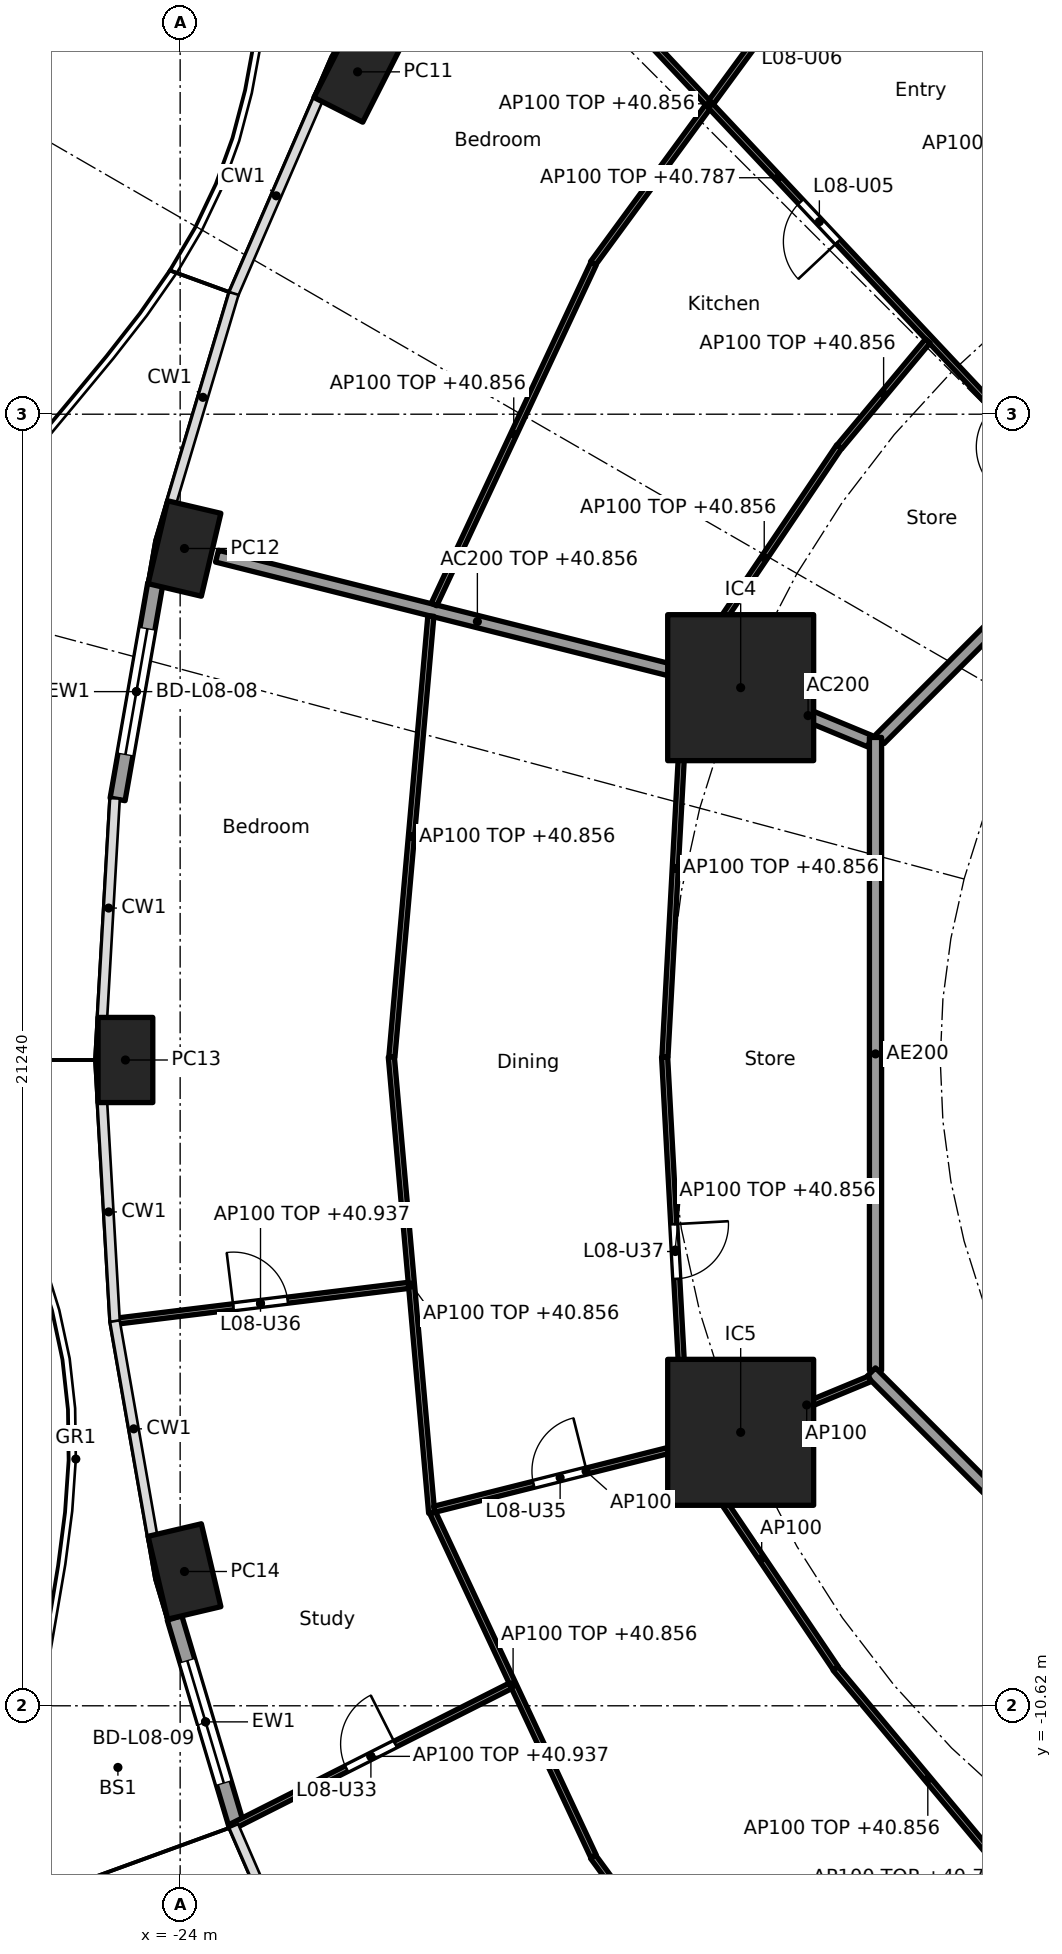
"""IFC4 building model, lengths in metres.
Left out: names, types, materials, properties, quantities, classifications, styles, units other than length and angle.
Written with IfcOpenShell. Run it as: python <this file> out.ifc"""

import sys

from ifc_helpers import new_model, si_unit, direction, frame, frame_2d, origin, origin_2d, place, context, subcontext, project, spatial, rectangle, hollow_rectangle, extrude, element, fill, save


model = new_model("IFC4")
c1 = context("Model", 3, precision=1e-05, world=origin(), true_north=direction((0.0, 1.0)))
c2 = subcontext(c1, "Body", "Model", "MODEL_VIEW")
j1 = project(units=[si_unit("LENGTHUNIT", "METRE"), si_unit("PLANEANGLEUNIT", "RADIAN")], contexts=[c1])
p1 = place(None, origin())
s1 = spatial("IfcSite", under=j1, at=p1, CompositionType="ELEMENT")
p2 = place(p1, origin())
s2 = spatial("IfcBuilding", under=s1, at=p2, CompositionType="ELEMENT")
p3 = place(p2, frame((0.0, 0.0, 38.1)))
s3 = spatial("IfcBuildingStorey", under=s2, at=p3, CompositionType="ELEMENT", Elevation=38.1)
for number, where, z_axis, x_axis in (
    (1, (-21.082, 16.25, 0.0), (0.0, 0.0, 1.0), (-0.452, -0.892, 0.0)),
    (2, (-23.929, 8.412, 0.0), (0.0, 0.0, 1.0), (-0.229, -0.973, 0.0)),
    (3, (-24.9, 0.0, 0.0), (0.0, 0.0, 1.0), (0.0, -1.0, 0.0)),
    (4, (-23.929, -8.412, 0.0), (0.0, 0.0, 1.0), (0.229, -0.973, 0.0)),
):
    element("IfcColumn", number, at=place(p3, frame(where, z_axis=z_axis, x_axis=x_axis)), inside=s3, PredefinedType="COLUMN", context=c2, shape_type="SweptSolid", body=[
        extrude(hollow_rectangle(XDim=1.4, YDim=0.9, WallThickness=0.05, at=origin_2d()), origin(), (0.0, 0.0, 1.0), 3.7),
    ])
for number, where, z_axis, x_axis in (
    (5, (-14.782, 6.123, 0.0), (0.0, 0.0, 1.0), (1.0, 0.0, 0.0)),
    (6, (-14.782, -6.123, 0.0), (0.0, 0.0, 1.0), (1.0, 0.0, 0.0)),
):
    element("IfcColumn", number, at=place(p3, frame(where, z_axis=z_axis, x_axis=x_axis)), inside=s3, PredefinedType="COLUMN", context=c2, shape_type="SweptSolid", body=[
        extrude(rectangle(XDim=2.4, YDim=2.4, at=origin_2d()), origin(), (0.0, 0.0, 1.0), 3.7),
    ])
p4 = place(p3, frame((-25.029, 4.286, 0.0), z_axis=(0.0, 0.0, 1.0), x_axis=(0.172217377323, 0.98505897029, 0.0)))
e7 = element("IfcWall", 7, at=p4, inside=s3, PredefinedType="SOLIDWALL", context=c2, shape_type="SweptSolid", body=[
    extrude(rectangle(XDim=3.598, YDim=0.25, at=frame_2d((1.799, 0.0))), origin(), (0.0, 0.0, 1.0), 3.44),
])
p5 = place(p4, frame((0.749, 0.0, 0.0)))
e8 = element("IfcOpeningElement", 8, at=p5, cuts=e7, PredefinedType="OPENING", context=c2, shape_type="SweptSolid", body=[
    extrude(rectangle(XDim=2.1, YDim=2.4, at=frame_2d((1.05, 1.2))), frame((0.0, 0.135, 0.0), z_axis=(0.0, -1.0, 0.0), x_axis=(1.0, 0.0, 0.0)), (0.0, 0.0, 1.0), 0.27),
])
p6 = place(p3, frame((-23.073, -12.593, 0.0), z_axis=(0.0, 0.0, 1.0), x_axis=(-0.285871309426, 0.958268018065, 0.0)))
e9 = element("IfcWall", 9, at=p6, inside=s3, PredefinedType="SOLIDWALL", context=c2, shape_type="SweptSolid", body=[
    extrude(rectangle(XDim=3.565, YDim=0.25, at=frame_2d((1.783, 0.0))), origin(), (0.0, 0.0, 1.0), 3.44),
])
p7 = place(p6, frame((0.733, 0.0, 0.0)))
e10 = element("IfcOpeningElement", 10, at=p7, cuts=e9, PredefinedType="OPENING", context=c2, shape_type="SweptSolid", body=[
    extrude(rectangle(XDim=2.1, YDim=2.4, at=frame_2d((1.05, 1.2))), frame((0.0, 0.135, 0.0), z_axis=(0.0, -1.0, 0.0), x_axis=(1.0, 0.0, 0.0)), (0.0, 0.0, 1.0), 0.27),
])
p8 = place(p3, frame((-12.657, 5.243, 0.0), z_axis=(0.0, 0.0, 1.0), x_axis=(-0.923885664896, 0.382668627144, 0.0)))
e11 = element("IfcWall", 11, at=p8, inside=s3, PredefinedType="PARTITIONING", context=c2, shape_type="SweptSolid", body=[
    extrude(rectangle(XDim=2.2, YDim=0.2, at=frame_2d((1.1, 0.0))), origin(), (0.0, 0.0, 1.0), 3.44),
])
p9 = place(p3, frame((-14.831, 6.135, 0.0), z_axis=(0.0, 0.0, 1.0), x_axis=(-0.969884949569, 0.243563512454, 0.0)))
e12 = element("IfcWall", 12, at=p9, inside=s3, PredefinedType="PARTITIONING", context=c2, shape_type="SweptSolid", body=[
    extrude(rectangle(XDim=8.829, YDim=0.2, at=frame_2d((4.415, 0.0))), origin(), (0.0, 0.0, 1.0), 2.756),
])
p10 = place(p3, frame((-5.275, 12.494, 0.0), z_axis=(0.0, 0.0, 1.0), x_axis=(-0.707106781187, -0.707106781187, 0.0)))
e13 = element("IfcWall", 13, at=p10, inside=s3, PredefinedType="PARTITIONING", context=c2, shape_type="SweptSolid", body=[
    extrude(rectangle(XDim=10.209, YDim=0.2, at=frame_2d((5.104, 0.0))), origin(), (0.0, 0.0, 1.0), 3.44),
])
p11 = place(p10, frame((2.87, 0.0, 0.0)))
e14 = element("IfcOpeningElement", 14, at=p11, cuts=e13, PredefinedType="OPENING", context=c2, shape_type="SweptSolid", body=[
    extrude(rectangle(XDim=1.0, YDim=2.1, at=frame_2d((0.5, 1.05))), frame((0.0, 0.11, 0.0), z_axis=(0.0, -1.0, 0.0), x_axis=(1.0, 0.0, 0.0)), (0.0, 0.0, 1.0), 0.22),
])
p12 = place(p3, frame((-12.565, 5.304, 0.0), z_axis=(0.0, 0.0, 1.0), x_axis=(0.0, -1.0, 0.0)))
e15 = element("IfcWall", 15, at=p12, inside=s3, PredefinedType="PARTITIONING", context=c2, shape_type="SweptSolid", body=[
    extrude(rectangle(XDim=10.409, YDim=0.2, at=frame_2d((5.205, 0.0))), origin(), (0.0, 0.0, 1.0), 3.44),
])
p13 = place(p3, frame((-12.635, -5.134, 0.0), z_axis=(0.0, 0.0, 1.0), x_axis=(0.707106781187, -0.707106781187, 0.0)))
e16 = element("IfcWall", 16, at=p13, inside=s3, PredefinedType="PARTITIONING", context=c2, shape_type="SweptSolid", body=[
    extrude(rectangle(XDim=10.609, YDim=0.2, at=frame_2d((5.305, 0.0))), origin(), (0.0, 0.0, 1.0), 3.44),
])
p14 = place(p3, frame((-6.477, 11.427, 0.0), z_axis=(0.0, 0.0, 1.0), x_axis=(-0.457464037982, 0.889228122561, 0.0)))
e17 = element("IfcWall", 17, at=p14, inside=s3, PredefinedType="PARTITIONING", context=c2, shape_type="SweptSolid", body=[
    extrude(rectangle(XDim=10.032, YDim=0.1, at=frame_2d((5.016, 0.0))), origin(), (0.0, 0.0, 1.0), 2.687),
])
p15 = place(p14, frame((0.35, 0.0, 0.0)))
e18 = element("IfcOpeningElement", 18, at=p15, cuts=e17, PredefinedType="OPENING", context=c2, shape_type="SweptSolid", body=[
    extrude(rectangle(XDim=0.9, YDim=2.1, at=frame_2d((0.45, 1.05))), frame((0.0, 0.06, 0.0), z_axis=(0.0, -1.0, 0.0), x_axis=(1.0, 0.0, 0.0)), (0.0, 0.0, 1.0), 0.12),
])
p16 = place(p14, frame((6.735, 0.0, 0.0)))
e19 = element("IfcOpeningElement", 19, at=p16, cuts=e17, PredefinedType="OPENING", context=c2, shape_type="SweptSolid", body=[
    extrude(rectangle(XDim=0.9, YDim=2.1, at=frame_2d((0.45, 1.05))), frame((0.0, 0.06, 0.0), z_axis=(0.0, -1.0, 0.0), x_axis=(1.0, 0.0, 0.0)), (0.0, 0.0, 1.0), 0.12),
])
p17 = place(p3, frame((-13.362, 18.35, 0.0), z_axis=(0.0, 0.0, 1.0), x_axis=(-0.591191311491, -0.806531359104, 0.0)))
e20 = element("IfcWall", 20, at=p17, inside=s3, PredefinedType="PARTITIONING", context=c2, shape_type="SweptSolid", body=[
    extrude(rectangle(XDim=6.51, YDim=0.1, at=frame_2d((3.255, 0.0))), origin(), (0.0, 0.0, 1.0), 2.756),
])
p18 = place(p17, frame((1.202, 0.0, 0.0)))
e21 = element("IfcOpeningElement", 21, at=p18, cuts=e20, PredefinedType="OPENING", context=c2, shape_type="SweptSolid", body=[
    extrude(rectangle(XDim=0.9, YDim=2.1, at=frame_2d((0.45, 1.05))), frame((0.0, 0.06, 0.0), z_axis=(0.0, -1.0, 0.0), x_axis=(1.0, 0.0, 0.0)), (0.0, 0.0, 1.0), 0.12),
])
p19 = place(p3, frame((-8.953, 8.958, 0.0), z_axis=(0.0, 0.0, 1.0), x_axis=(-0.684574307023, 0.728943082939, 0.0)))
e22 = element("IfcWall", 22, at=p19, inside=s3, PredefinedType="PARTITIONING", context=c2, shape_type="SweptSolid", body=[
    extrude(rectangle(XDim=15.231, YDim=0.1, at=frame_2d((7.615, 0.0))), origin(), (0.0, 0.0, 1.0), 2.687),
])
p20 = place(p19, frame((1.54, 0.0, 0.0)))
e23 = element("IfcOpeningElement", 23, at=p20, cuts=e22, PredefinedType="OPENING", context=c2, shape_type="SweptSolid", body=[
    extrude(rectangle(XDim=0.9, YDim=2.1, at=frame_2d((0.45, 1.05))), frame((0.0, 0.06, 0.0), z_axis=(0.0, -1.0, 0.0), x_axis=(1.0, 0.0, 0.0)), (0.0, 0.0, 1.0), 0.12),
])
p21 = place(p19, frame((6.174, 0.0, 0.0)))
e24 = element("IfcOpeningElement", 24, at=p21, cuts=e22, PredefinedType="OPENING", context=c2, shape_type="SweptSolid", body=[
    extrude(rectangle(XDim=0.9, YDim=2.1, at=frame_2d((0.45, 1.05))), frame((0.0, 0.06, 0.0), z_axis=(0.0, -1.0, 0.0), x_axis=(1.0, 0.0, 0.0)), (0.0, 0.0, 1.0), 0.12),
])
p22 = place(p19, frame((11.8, 0.0, 0.0)))
e25 = element("IfcOpeningElement", 25, at=p22, cuts=e22, PredefinedType="OPENING", context=c2, shape_type="SweptSolid", body=[
    extrude(rectangle(XDim=0.9, YDim=2.1, at=frame_2d((0.45, 1.05))), frame((0.0, 0.06, 0.0), z_axis=(0.0, -1.0, 0.0), x_axis=(1.0, 0.0, 0.0)), (0.0, 0.0, 1.0), 0.12),
])
p23 = place(p3, frame((-11.705, 11.825, 0.0), z_axis=(0.0, 0.0, 1.0), x_axis=(-0.640861724905, -0.767656335577, 0.0)))
e26 = element("IfcWall", 26, at=p23, inside=s3, PredefinedType="PARTITIONING", context=c2, shape_type="SweptSolid", body=[
    extrude(rectangle(XDim=2.268, YDim=0.1, at=frame_2d((1.134, 0.0))), origin(), (0.0, 0.0, 1.0), 2.756),
])
p24 = place(p3, frame((-13.162, 10.087, 0.0), z_axis=(0.0, 0.0, 1.0), x_axis=(-0.55912750241, -0.829081682375, 0.0)))
e27 = element("IfcWall", 27, at=p24, inside=s3, PredefinedType="PARTITIONING", context=c2, shape_type="SweptSolid", body=[
    extrude(rectangle(XDim=4.408, YDim=0.1, at=frame_2d((2.204, 0.0))), origin(), (0.0, 0.0, 1.0), 2.756),
])
p25 = place(p3, frame((-17.203, 13.095, 0.0), z_axis=(0.0, 0.0, 1.0), x_axis=(-0.423926333401, -0.905696673202, 0.0)))
e28 = element("IfcWall", 28, at=p25, inside=s3, PredefinedType="PARTITIONING", context=c2, shape_type="SweptSolid", body=[
    extrude(rectangle(XDim=6.188, YDim=0.1, at=frame_2d((3.094, 0.0))), origin(), (0.0, 0.0, 1.0), 2.756),
])
p26 = place(p3, frame((-15.688, 6.249, 0.0), z_axis=(0.0, 0.0, 1.0), x_axis=(-0.054659814056, -0.998505034903, 0.0)))
e29 = element("IfcWall", 29, at=p26, inside=s3, PredefinedType="PARTITIONING", context=c2, shape_type="SweptSolid", body=[
    extrude(rectangle(XDim=6.208, YDim=0.1, at=frame_2d((3.104, 0.0))), origin(), (0.0, 0.0, 1.0), 2.756),
])
p27 = place(p3, frame((-19.877, 7.301, 0.0), z_axis=(0.0, 0.0, 1.0), x_axis=(-0.088143415068, -0.996107794558, 0.0)))
e30 = element("IfcWall", 30, at=p27, inside=s3, PredefinedType="PARTITIONING", context=c2, shape_type="SweptSolid", body=[
    extrude(rectangle(XDim=7.279, YDim=0.1, at=frame_2d((3.64, 0.0))), origin(), (0.0, 0.0, 1.0), 2.756),
])
p28 = place(p3, frame((-16.033, 0.05, 0.0), z_axis=(0.0, 0.0, 1.0), x_axis=(0.054634315779, -0.998506430395, 0.0)))
e31 = element("IfcWall", 31, at=p28, inside=s3, PredefinedType="PARTITIONING", context=c2, shape_type="SweptSolid", body=[
    extrude(rectangle(XDim=6.359, YDim=0.1, at=frame_2d((3.179, 0.0))), origin(), (0.0, 0.0, 1.0), 2.756),
])
p29 = place(p28, frame((2.754, 0.0, 0.0)))
e32 = element("IfcOpeningElement", 32, at=p29, cuts=e31, PredefinedType="OPENING", context=c2, shape_type="SweptSolid", body=[
    extrude(rectangle(XDim=0.9, YDim=2.1, at=frame_2d((0.45, 1.05))), frame((0.0, 0.06, 0.0), z_axis=(0.0, -1.0, 0.0), x_axis=(1.0, 0.0, 0.0)), (0.0, 0.0, 1.0), 0.12),
])
p30 = place(p3, frame((-20.527, 0.05, 0.0), z_axis=(0.0, 0.0, 1.0), x_axis=(0.088135127406, -0.996108527881, 0.0)))
e33 = element("IfcWall", 33, at=p30, inside=s3, PredefinedType="PARTITIONING", context=c2, shape_type="SweptSolid", body=[
    extrude(rectangle(XDim=7.529, YDim=0.1, at=frame_2d((3.765, 0.0))), origin(), (0.0, 0.0, 1.0), 2.756),
])
p31 = place(p3, frame((-20.245, -3.706, 0.0), z_axis=(0.0, 0.0, 1.0), x_axis=(-0.992575966227, -0.121626277047, 0.0)))
e34 = element("IfcWall", 34, at=p31, inside=s3, PredefinedType="PARTITIONING", context=c2, shape_type="SweptSolid", body=[
    extrude(rectangle(XDim=4.904, YDim=0.1, at=frame_2d((2.452, 0.0))), origin(), (0.0, 0.0, 1.0), 2.837),
])
p32 = place(p31, frame((2.002, 0.0, 0.0)))
e35 = element("IfcOpeningElement", 35, at=p32, cuts=e34, PredefinedType="OPENING", context=c2, shape_type="SweptSolid", body=[
    extrude(rectangle(XDim=0.9, YDim=2.1, at=frame_2d((0.45, 1.05))), frame((0.0, 0.06, 0.0), z_axis=(0.0, -1.0, 0.0), x_axis=(1.0, 0.0, 0.0)), (0.0, 0.0, 1.0), 0.12),
])
p33 = place(p3, frame((-12.657, -5.243, 0.0), z_axis=(0.0, 0.0, 1.0), x_axis=(-0.923864733477, -0.382719158442, 0.0)))
e36 = element("IfcWall", 36, at=p33, inside=s3, PredefinedType="PARTITIONING", context=c2, shape_type="SweptSolid", body=[
    extrude(rectangle(XDim=2.25, YDim=0.1, at=frame_2d((1.125, 0.0))), origin(), (0.0, 0.0, 1.0), 3.44),
])
p34 = place(p3, frame((-14.831, -6.135, 0.0), z_axis=(0.0, 0.0, 1.0), x_axis=(-0.96988230015, -0.243574062362, 0.0)))
e37 = element("IfcWall", 37, at=p34, inside=s3, PredefinedType="PARTITIONING", context=c2, shape_type="SweptSolid", body=[
    extrude(rectangle(XDim=5.144, YDim=0.1, at=frame_2d((2.572, 0.0))), origin(), (0.0, 0.0, 1.0), 3.44),
])
p35 = place(p34, frame((2.561, 0.0, 0.0)))
e38 = element("IfcOpeningElement", 38, at=p35, cuts=e37, PredefinedType="OPENING", context=c2, shape_type="SweptSolid", body=[
    extrude(rectangle(XDim=0.9, YDim=2.1, at=frame_2d((0.45, 1.05))), frame((0.0, 0.06, 0.0), z_axis=(0.0, -1.0, 0.0), x_axis=(1.0, 0.0, 0.0)), (0.0, 0.0, 1.0), 0.12),
])
p36 = place(p3, frame((-15.655, -6.391, 0.0), z_axis=(0.0, 0.0, 1.0), x_axis=(0.559126445155, -0.82908239538, 0.0)))
e39 = element("IfcWall", 39, at=p36, inside=s3, PredefinedType="PARTITIONING", context=c2, shape_type="SweptSolid", body=[
    extrude(rectangle(XDim=4.358, YDim=0.1, at=frame_2d((2.179, 0.0))), origin(), (0.0, 0.0, 1.0), 3.44),
])
p37 = place(p3, frame((-19.847, -7.445, 0.0), z_axis=(0.0, 0.0, 1.0), x_axis=(0.423892287987, -0.905712607942, 0.0)))
e40 = element("IfcWall", 40, at=p37, inside=s3, PredefinedType="PARTITIONING", context=c2, shape_type="SweptSolid", body=[
    extrude(rectangle(XDim=6.238, YDim=0.1, at=frame_2d((3.119, 0.0))), origin(), (0.0, 0.0, 1.0), 2.756),
])
p38 = place(p3, frame((-18.569, -10.292, 0.0), z_axis=(0.0, 0.0, 1.0), x_axis=(-0.892519131357, -0.451009534446, 0.0)))
e41 = element("IfcWall", 41, at=p38, inside=s3, PredefinedType="PARTITIONING", context=c2, shape_type="SweptSolid", body=[
    extrude(rectangle(XDim=5.14, YDim=0.1, at=frame_2d((2.57, 0.0))), origin(), (0.0, 0.0, 1.0), 2.837),
])
p39 = place(p38, frame((2.12, 0.0, 0.0)))
e42 = element("IfcOpeningElement", 42, at=p39, cuts=e41, PredefinedType="OPENING", context=c2, shape_type="SweptSolid", body=[
    extrude(rectangle(XDim=0.9, YDim=2.1, at=frame_2d((0.45, 1.05))), frame((0.0, 0.06, 0.0), z_axis=(0.0, -1.0, 0.0), x_axis=(1.0, 0.0, 0.0)), (0.0, 0.0, 1.0), 0.12),
])
p40 = place(p3, frame((-13.222, -10.007, 0.0), z_axis=(0.0, 0.0, 1.0), x_axis=(0.640807748916, -0.767701393075, 0.0)))
e43 = element("IfcWall", 43, at=p40, inside=s3, PredefinedType="PARTITIONING", context=c2, shape_type="SweptSolid", body=[
    extrude(rectangle(XDim=4.737, YDim=0.1, at=frame_2d((2.368, 0.0))), origin(), (0.0, 0.0, 1.0), 2.756),
])
p41 = place(p3, frame((-17.211, -13.1, 0.0), z_axis=(0.0, 0.0, 1.0), x_axis=(0.591206785834, -0.806520016109, 0.0)))
e44 = element("IfcWall", 44, at=p41, inside=s3, PredefinedType="PARTITIONING", context=c2, shape_type="SweptSolid", body=[
    extrude(rectangle(XDim=6.41, YDim=0.1, at=frame_2d((3.205, 0.0))), origin(), (0.0, 0.0, 1.0), 2.756),
])
p42 = place(p3, frame((-7.715, -10.193, 0.0), z_axis=(0.0, 0.0, 1.0), x_axis=(-0.573126502256, -0.819466907454, 0.0)))
e45 = element("IfcWall", 45, at=p42, inside=s3, PredefinedType="PARTITIONING", context=c2, shape_type="SweptSolid", body=[
    extrude(rectangle(XDim=9.954, YDim=0.1, at=frame_2d((4.977, 0.0))), origin(), (0.0, 0.0, 1.0), 2.687),
])
p43 = place(p42, frame((6.631, 0.0, 0.0)))
e46 = element("IfcOpeningElement", 46, at=p43, cuts=e45, PredefinedType="OPENING", context=c2, shape_type="SweptSolid", body=[
    extrude(rectangle(XDim=0.9, YDim=2.1, at=frame_2d((0.45, 1.05))), frame((0.0, 0.06, 0.0), z_axis=(0.0, -1.0, 0.0), x_axis=(1.0, 0.0, 0.0)), (0.0, 0.0, 1.0), 0.12),
])
p44 = place(p42, frame((1.678, 0.0, 0.0)))
e47 = element("IfcOpeningElement", 47, at=p44, cuts=e45, PredefinedType="OPENING", context=c2, shape_type="SweptSolid", body=[
    extrude(rectangle(XDim=0.9, YDim=2.1, at=frame_2d((0.45, 1.05))), frame((0.0, 0.06, 0.0), z_axis=(0.0, -1.0, 0.0), x_axis=(1.0, 0.0, 0.0)), (0.0, 0.0, 1.0), 0.12),
])
p45 = place(p5, origin())
e48 = element("IfcDoor", 48, at=p45, inside=s3, OperationType="SLIDING_TO_LEFT", PredefinedType="DOOR", context=c2, shape_type="SweptSolid", body=[
    extrude(rectangle(XDim=2.1, YDim=2.4, at=frame_2d((1.05, 1.2))), frame((0.0, 0.025, 0.0), z_axis=(0.0, -1.0, 0.0), x_axis=(1.0, 0.0, 0.0)), (0.0, 0.0, 1.0), 0.05),
])
fill(e8, e48)
p46 = place(p7, origin())
e49 = element("IfcDoor", 49, at=p46, inside=s3, OperationType="SLIDING_TO_LEFT", PredefinedType="DOOR", context=c2, shape_type="SweptSolid", body=[
    extrude(rectangle(XDim=2.1, YDim=2.4, at=frame_2d((1.05, 1.2))), frame((0.0, 0.025, 0.0), z_axis=(0.0, -1.0, 0.0), x_axis=(1.0, 0.0, 0.0)), (0.0, 0.0, 1.0), 0.05),
])
fill(e10, e49)
p47 = place(p21, origin())
e50 = element("IfcDoor", 50, at=p47, inside=s3, OperationType="SINGLE_SWING_LEFT", PredefinedType="DOOR", context=c2, shape_type="SweptSolid", body=[
    extrude(rectangle(XDim=0.9, YDim=2.1, at=frame_2d((0.45, 1.05))), frame((0.0, 0.025, 0.0), z_axis=(0.0, -1.0, 0.0), x_axis=(1.0, 0.0, 0.0)), (0.0, 0.0, 1.0), 0.05),
])
fill(e24, e50)
p48 = place(p39, frame((0.9, 0.0, 0.0), x_axis=(-1.0, 0.0, 0.0)))
e51 = element("IfcDoor", 51, at=p48, inside=s3, OperationType="SINGLE_SWING_RIGHT", PredefinedType="DOOR", context=c2, shape_type="SweptSolid", body=[
    extrude(rectangle(XDim=0.9, YDim=2.1, at=frame_2d((0.45, 1.05))), frame((0.0, 0.025, 0.0), z_axis=(0.0, -1.0, 0.0), x_axis=(1.0, 0.0, 0.0)), (0.0, 0.0, 1.0), 0.05),
])
fill(e42, e51)
p49 = place(p35, frame((0.9, 0.0, 0.0), x_axis=(-1.0, 0.0, 0.0)))
e52 = element("IfcDoor", 52, at=p49, inside=s3, OperationType="SINGLE_SWING_RIGHT", PredefinedType="DOOR", context=c2, shape_type="SweptSolid", body=[
    extrude(rectangle(XDim=0.9, YDim=2.1, at=frame_2d((0.45, 1.05))), frame((0.0, 0.025, 0.0), z_axis=(0.0, -1.0, 0.0), x_axis=(1.0, 0.0, 0.0)), (0.0, 0.0, 1.0), 0.05),
])
fill(e38, e52)
p50 = place(p32, frame((0.9, 0.0, 0.0), x_axis=(-1.0, 0.0, 0.0)))
e53 = element("IfcDoor", 53, at=p50, inside=s3, OperationType="SINGLE_SWING_LEFT", PredefinedType="DOOR", context=c2, shape_type="SweptSolid", body=[
    extrude(rectangle(XDim=0.9, YDim=2.1, at=frame_2d((0.45, 1.05))), frame((0.0, 0.025, 0.0), z_axis=(0.0, -1.0, 0.0), x_axis=(1.0, 0.0, 0.0)), (0.0, 0.0, 1.0), 0.05),
])
fill(e35, e53)
p51 = place(p29, origin())
e54 = element("IfcDoor", 54, at=p51, inside=s3, OperationType="SINGLE_SWING_LEFT", PredefinedType="DOOR", context=c2, shape_type="SweptSolid", body=[
    extrude(rectangle(XDim=0.9, YDim=2.1, at=frame_2d((0.45, 1.05))), frame((0.0, 0.025, 0.0), z_axis=(0.0, -1.0, 0.0), x_axis=(1.0, 0.0, 0.0)), (0.0, 0.0, 1.0), 0.05),
])
fill(e32, e54)
save(model, sys.argv[1])
